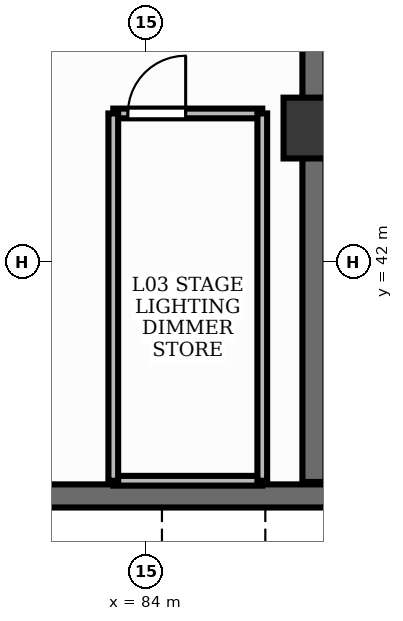
"""IFC4 building model, lengths in metres.
Left out: names, types, materials, properties, quantities, classifications, styles, units other than length and angle.
Written with IfcOpenShell. Run it as: python <this file> out.ifc"""

import sys

from ifc_helpers import new_model, si_unit, direction, frame, frame_2d, origin, origin_2d, place, context, subcontext, project, spatial, rectangle, extrude, element, fill, save


model = new_model("IFC4")
c1 = context("Model", 3, precision=1e-05, world=origin(), true_north=direction((0.0, 1.0)))
c2 = subcontext(c1, "Body", "Model", "MODEL_VIEW")
j1 = project(units=[si_unit("LENGTHUNIT", "METRE"), si_unit("PLANEANGLEUNIT", "RADIAN")], contexts=[c1])
p1 = place(None, origin())
s1 = spatial("IfcSite", under=j1, at=p1, CompositionType="ELEMENT")
p2 = place(p1, origin())
s2 = spatial("IfcBuilding", under=s1, at=p2, CompositionType="ELEMENT")
p3 = place(p2, frame((0.0, 0.0, 15.0)))
s3 = spatial("IfcBuildingStorey", under=s2, at=p3, CompositionType="ELEMENT", Elevation=15.0)
p4 = place(p3, frame((86.75, 44.2, 0.0), z_axis=(0.0, 0.0, 1.0), x_axis=(1.0, 0.0, 0.0)))
e1 = element("IfcColumn", 1, at=p4, inside=s3, PredefinedType="COLUMN", context=c2, shape_type="SweptSolid", body=[
    extrude(rectangle(XDim=1.0, YDim=1.0, at=origin_2d()), origin(), (0.0, 0.0, 1.0), 5.1),
])
p5 = place(p3, frame((86.75, 38.38, 0.0), z_axis=(0.0, 0.0, 1.0), x_axis=(0.0, 1.0, 0.0)))
e2 = element("IfcWall", 2, at=p5, inside=s3, PredefinedType="SHEAR", context=c2, shape_type="SweptSolid", body=[
    extrude(rectangle(XDim=8.41, YDim=0.38, at=frame_2d((4.205, 0.0))), origin(), (0.0, 0.0, 1.0), 5.1),
])
p6 = place(p3, frame((76.4, 38.15, 0.0), z_axis=(0.0, 0.0, 1.0), x_axis=(1.0, 0.0, 0.0)))
e3 = element("IfcWall", 3, at=p6, inside=s3, PredefinedType="SHEAR", context=c2, shape_type="SweptSolid", body=[
    extrude(rectangle(XDim=15.75, YDim=0.38, at=frame_2d((7.875, 0.0))), origin(), (0.0, 0.0, 1.0), 5.1),
])
p7 = place(p3, frame((83.45, 44.44, 0.0), z_axis=(0.0, 0.0, 1.0), x_axis=(1.0, 0.0, 0.0)))
e4 = element("IfcWall", 4, at=p7, inside=s3, PredefinedType="PARTITIONING", context=c2, shape_type="SweptSolid", body=[
    extrude(rectangle(XDim=2.45, YDim=0.16, at=frame_2d((1.225, 0.0))), origin(), (0.0, 0.0, 1.0), 3.36),
])
p8 = place(p7, frame((0.24, 0.0, 0.0)))
e5 = element("IfcOpeningElement", 5, at=p8, cuts=e4, PredefinedType="OPENING", context=c2, shape_type="SweptSolid", body=[
    extrude(rectangle(XDim=0.95, YDim=2.15, at=frame_2d((0.475, 1.075))), frame((0.0, 0.095, 0.0), z_axis=(0.0, -1.0, 0.0), x_axis=(1.0, 0.0, 0.0)), (0.0, 0.0, 1.0), 0.19),
])
p9 = place(p3, frame((85.9, 38.4, 0.0), z_axis=(0.0, 0.0, 1.0), x_axis=(-1.0, 0.0, 0.0)))
e6 = element("IfcWall", 6, at=p9, inside=s3, PredefinedType="PARTITIONING", context=c2, shape_type="SweptSolid", body=[
    extrude(rectangle(XDim=2.45, YDim=0.16, at=frame_2d((1.225, 0.0))), origin(), (0.0, 0.0, 1.0), 3.36),
])
for number, where, z_axis, x_axis in (
    (7, (83.45, 38.4, 0.0), (0.0, 0.0, 1.0), (0.0, 1.0, 0.0)),
    (8, (85.9, 44.44, 0.0), (0.0, 0.0, 1.0), (0.0, -1.0, 0.0)),
):
    element("IfcWall", number, at=place(p3, frame(where, z_axis=z_axis, x_axis=x_axis)), inside=s3, PredefinedType="PARTITIONING", context=c2, shape_type="SweptSolid", body=[
        extrude(rectangle(XDim=6.04, YDim=0.16, at=frame_2d((3.02, 0.0))), origin(), (0.0, 0.0, 1.0), 3.36),
    ])
p10 = place(p8, origin())
e9 = element("IfcDoor", 9, at=p10, inside=s3, OperationType="SINGLE_SWING_RIGHT", PredefinedType="DOOR", context=c2, shape_type="SweptSolid", body=[
    extrude(rectangle(XDim=0.95, YDim=2.15, at=frame_2d((0.475, 1.075))), frame((0.0, 0.025, 0.0), z_axis=(0.0, -1.0, 0.0), x_axis=(1.0, 0.0, 0.0)), (0.0, 0.0, 1.0), 0.05),
])
fill(e5, e9)
save(model, sys.argv[1])
